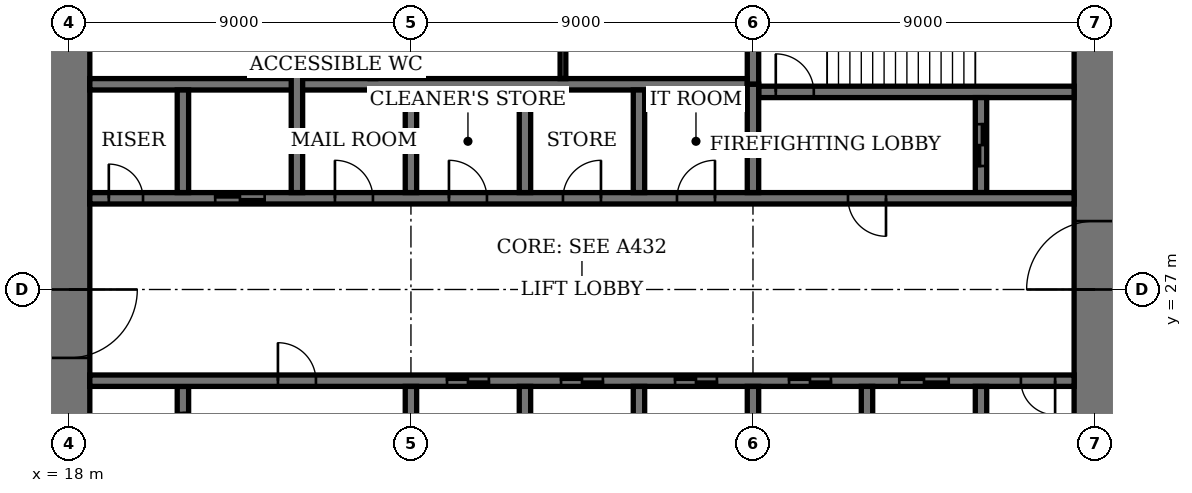
"""IFC4 building model, lengths in metres.
Left out: names, types, materials, properties, quantities, classifications, styles, units other than length and angle.
Written with IfcOpenShell. Run it as: python <this file> out.ifc"""

import sys

from ifc_helpers import new_model, si_unit, direction, frame, frame_2d, origin, place, context, subcontext, project, spatial, rectangle, extrude, element, fill, save


model = new_model("IFC4")
c1 = context("Model", 3, precision=1e-05, world=origin(), true_north=direction((0.0, 1.0)))
c2 = subcontext(c1, "Body", "Model", "MODEL_VIEW")
j1 = project(units=[si_unit("LENGTHUNIT", "METRE"), si_unit("PLANEANGLEUNIT", "RADIAN")], contexts=[c1])
p1 = place(None, origin())
s1 = spatial("IfcSite", under=j1, at=p1, CompositionType="ELEMENT")
p2 = place(p1, origin())
s2 = spatial("IfcBuilding", under=s1, at=p2, CompositionType="ELEMENT")
p3 = place(p2, frame((0.0, 0.0, 247.4)))
s3 = spatial("IfcBuildingStorey", under=s2, at=p3, CompositionType="ELEMENT", Elevation=247.4)
p4 = place(p3, frame((18.0, 35.45, 0.0), z_axis=(0.0, 0.0, 1.0), x_axis=(0.0, -1.0, 0.0)))
e1 = element("IfcWall", 1, at=p4, inside=s3, PredefinedType="SHEAR", context=c2, shape_type="SweptSolid", body=[
    extrude(rectangle(XDim=16.9, YDim=1.1, at=frame_2d((8.45, 0.0))), origin(), (0.0, 0.0, 1.0), 4.0),
])
p5 = place(p4, frame((8.45, 0.0, 0.0)))
e2 = element("IfcOpeningElement", 2, at=p5, cuts=e1, PredefinedType="OPENING", context=c2, shape_type="SweptSolid", body=[
    extrude(rectangle(XDim=1.8, YDim=2.4, at=frame_2d((0.9, 1.2))), frame((0.0, 0.56, 0.0), z_axis=(0.0, -1.0, 0.0), x_axis=(1.0, 0.0, 0.0)), (0.0, 0.0, 1.0), 1.12),
])
p6 = place(p3, frame((45.0, 18.55, 0.0), z_axis=(0.0, 0.0, 1.0), x_axis=(0.0, 1.0, 0.0)))
e3 = element("IfcWall", 3, at=p6, inside=s3, PredefinedType="SHEAR", context=c2, shape_type="SweptSolid", body=[
    extrude(rectangle(XDim=16.9, YDim=1.1, at=frame_2d((8.45, 0.0))), origin(), (0.0, 0.0, 1.0), 4.0),
])
p7 = place(p6, frame((8.45, 0.0, 0.0)))
e4 = element("IfcOpeningElement", 4, at=p7, cuts=e3, PredefinedType="OPENING", context=c2, shape_type="SweptSolid", body=[
    extrude(rectangle(XDim=1.8, YDim=2.4, at=frame_2d((0.9, 1.2))), frame((0.0, 0.56, 0.0), z_axis=(0.0, -1.0, 0.0), x_axis=(1.0, 0.0, 0.0)), (0.0, 0.0, 1.0), 1.12),
])
p8 = place(p3, frame((36.15, 32.2, 0.0), z_axis=(0.0, 0.0, 1.0), x_axis=(1.0, 0.0, 0.0)))
e5 = element("IfcWall", 5, at=p8, inside=s3, PredefinedType="SHEAR", context=c2, shape_type="SweptSolid", body=[
    extrude(rectangle(XDim=8.3, YDim=0.3, at=frame_2d((4.15, 0.0))), origin(), (0.0, 0.0, 1.0), 4.0),
])
p9 = place(p8, frame((0.45, 0.0, 0.0)))
e6 = element("IfcOpeningElement", 6, at=p9, cuts=e5, PredefinedType="OPENING", context=c2, shape_type="SweptSolid", body=[
    extrude(rectangle(XDim=1.0, YDim=2.4, at=frame_2d((0.5, 1.2))), frame((0.0, 0.16, 0.0), z_axis=(0.0, -1.0, 0.0), x_axis=(1.0, 0.0, 0.0)), (0.0, 0.0, 1.0), 0.32),
])
p10 = place(p3, frame((36.0, 32.4, 0.0), z_axis=(0.0, 0.0, 1.0), x_axis=(0.0, 1.0, 0.0)))
e7 = element("IfcWall", 7, at=p10, inside=s3, PredefinedType="SHEAR", context=c2, shape_type="SweptSolid", body=[
    extrude(rectangle(XDim=3.05, YDim=0.3, at=frame_2d((1.525, 0.0))), origin(), (0.0, 0.0, 1.0), 4.0),
])
p11 = place(p3, frame((21.0, 21.95, 0.0), z_axis=(0.0, 0.0, 1.0), x_axis=(0.0, 1.0, 0.0)))
e8 = element("IfcWall", 8, at=p11, inside=s3, PredefinedType="SHEAR", context=c2, shape_type="SweptSolid", body=[
    extrude(rectangle(XDim=2.5, YDim=0.3, at=frame_2d((1.25, 0.0))), origin(), (0.0, 0.0, 1.0), 4.0),
])
p12 = place(p11, frame((0.7, 0.0, 0.0)))
e9 = element("IfcOpeningElement", 9, at=p12, cuts=e8, PredefinedType="OPENING", context=c2, shape_type="SweptSolid", body=[
    extrude(rectangle(XDim=1.1, YDim=2.4, at=frame_2d((0.55, 1.2))), frame((0.0, 0.16, 0.0), z_axis=(0.0, -1.0, 0.0), x_axis=(1.0, 0.0, 0.0)), (0.0, 0.0, 1.0), 0.32),
])
p13 = place(p3, frame((42.0, 29.55, 0.0), z_axis=(0.0, 0.0, 1.0), x_axis=(0.0, 1.0, 0.0)))
e10 = element("IfcWall", 10, at=p13, inside=s3, PredefinedType="SHEAR", context=c2, shape_type="SweptSolid", body=[
    extrude(rectangle(XDim=2.5, YDim=0.3, at=frame_2d((1.25, 0.0))), origin(), (0.0, 0.0, 1.0), 4.0),
])
p14 = place(p13, frame((0.7, 0.0, 0.0)))
e11 = element("IfcOpeningElement", 11, at=p14, cuts=e10, PredefinedType="OPENING", context=c2, shape_type="SweptSolid", body=[
    extrude(rectangle(XDim=1.1, YDim=2.4, at=frame_2d((0.55, 1.2))), frame((0.0, 0.16, 0.0), z_axis=(0.0, -1.0, 0.0), x_axis=(1.0, 0.0, 0.0)), (0.0, 0.0, 1.0), 0.32),
])
p15 = place(p3, frame((18.55, 24.6, 0.0), z_axis=(0.0, 0.0, 1.0), x_axis=(1.0, 0.0, 0.0)))
e12 = element("IfcWall", 12, at=p15, inside=s3, PredefinedType="SHEAR", context=c2, shape_type="SweptSolid", body=[
    extrude(rectangle(XDim=25.9, YDim=0.3, at=frame_2d((12.95, 0.0))), origin(), (0.0, 0.0, 1.0), 4.0),
])
p16 = place(p15, frame((4.95, 0.0, 0.0)))
e13 = element("IfcOpeningElement", 13, at=p16, cuts=e12, PredefinedType="OPENING", context=c2, shape_type="SweptSolid", body=[
    extrude(rectangle(XDim=1.0, YDim=2.4, at=frame_2d((0.5, 1.2))), frame((0.0, 0.16, 0.0), z_axis=(0.0, -1.0, 0.0), x_axis=(1.0, 0.0, 0.0)), (0.0, 0.0, 1.0), 0.32),
])
p17 = place(p15, frame((24.5, 0.0, 0.0)))
e14 = element("IfcOpeningElement", 14, at=p17, cuts=e12, PredefinedType="OPENING", context=c2, shape_type="SweptSolid", body=[
    extrude(rectangle(XDim=0.9, YDim=2.1, at=frame_2d((0.45, 1.05))), frame((0.0, 0.16, 0.0), z_axis=(0.0, -1.0, 0.0), x_axis=(1.0, 0.0, 0.0)), (0.0, 0.0, 1.0), 0.32),
])
p18 = place(p15, frame((9.4, 0.0, 0.0)))
e15 = element("IfcOpeningElement", 15, at=p18, cuts=e12, PredefinedType="OPENING", context=c2, shape_type="SweptSolid", body=[
    extrude(rectangle(XDim=1.1, YDim=2.4, at=frame_2d((0.55, 1.2))), frame((0.0, 0.16, 0.0), z_axis=(0.0, -1.0, 0.0), x_axis=(1.0, 0.0, 0.0)), (0.0, 0.0, 1.0), 0.32),
])
p19 = place(p15, frame((12.4, 0.0, 0.0)))
e16 = element("IfcOpeningElement", 16, at=p19, cuts=e12, PredefinedType="OPENING", context=c2, shape_type="SweptSolid", body=[
    extrude(rectangle(XDim=1.1, YDim=2.4, at=frame_2d((0.55, 1.2))), frame((0.0, 0.16, 0.0), z_axis=(0.0, -1.0, 0.0), x_axis=(1.0, 0.0, 0.0)), (0.0, 0.0, 1.0), 0.32),
])
p20 = place(p15, frame((15.4, 0.0, 0.0)))
e17 = element("IfcOpeningElement", 17, at=p20, cuts=e12, PredefinedType="OPENING", context=c2, shape_type="SweptSolid", body=[
    extrude(rectangle(XDim=1.1, YDim=2.4, at=frame_2d((0.55, 1.2))), frame((0.0, 0.16, 0.0), z_axis=(0.0, -1.0, 0.0), x_axis=(1.0, 0.0, 0.0)), (0.0, 0.0, 1.0), 0.32),
])
p21 = place(p15, frame((18.4, 0.0, 0.0)))
e18 = element("IfcOpeningElement", 18, at=p21, cuts=e12, PredefinedType="OPENING", context=c2, shape_type="SweptSolid", body=[
    extrude(rectangle(XDim=1.1, YDim=2.4, at=frame_2d((0.55, 1.2))), frame((0.0, 0.16, 0.0), z_axis=(0.0, -1.0, 0.0), x_axis=(1.0, 0.0, 0.0)), (0.0, 0.0, 1.0), 0.32),
])
p22 = place(p15, frame((21.3, 0.0, 0.0)))
e19 = element("IfcOpeningElement", 19, at=p22, cuts=e12, PredefinedType="OPENING", context=c2, shape_type="SweptSolid", body=[
    extrude(rectangle(XDim=1.3, YDim=2.4, at=frame_2d((0.65, 1.2))), frame((0.0, 0.16, 0.0), z_axis=(0.0, -1.0, 0.0), x_axis=(1.0, 0.0, 0.0)), (0.0, 0.0, 1.0), 0.32),
])
p23 = place(p3, frame((18.55, 29.4, 0.0), z_axis=(0.0, 0.0, 1.0), x_axis=(1.0, 0.0, 0.0)))
e20 = element("IfcWall", 20, at=p23, inside=s3, PredefinedType="SHEAR", context=c2, shape_type="SweptSolid", body=[
    extrude(rectangle(XDim=25.9, YDim=0.3, at=frame_2d((12.95, 0.0))), origin(), (0.0, 0.0, 1.0), 4.0),
])
p24 = place(p23, frame((19.95, 0.0, 0.0)))
e21 = element("IfcOpeningElement", 21, at=p24, cuts=e20, PredefinedType="OPENING", context=c2, shape_type="SweptSolid", body=[
    extrude(rectangle(XDim=1.0, YDim=2.4, at=frame_2d((0.5, 1.2))), frame((0.0, 0.16, 0.0), z_axis=(0.0, -1.0, 0.0), x_axis=(1.0, 0.0, 0.0)), (0.0, 0.0, 1.0), 0.32),
])
p25 = place(p23, frame((0.5, 0.0, 0.0)))
e22 = element("IfcOpeningElement", 22, at=p25, cuts=e20, PredefinedType="OPENING", context=c2, shape_type="SweptSolid", body=[
    extrude(rectangle(XDim=0.9, YDim=2.1, at=frame_2d((0.45, 1.05))), frame((0.0, 0.16, 0.0), z_axis=(0.0, -1.0, 0.0), x_axis=(1.0, 0.0, 0.0)), (0.0, 0.0, 1.0), 0.32),
])
p26 = place(p23, frame((15.45, 0.0, 0.0)))
e23 = element("IfcOpeningElement", 23, at=p26, cuts=e20, PredefinedType="OPENING", context=c2, shape_type="SweptSolid", body=[
    extrude(rectangle(XDim=1.0, YDim=2.4, at=frame_2d((0.5, 1.2))), frame((0.0, 0.16, 0.0), z_axis=(0.0, -1.0, 0.0), x_axis=(1.0, 0.0, 0.0)), (0.0, 0.0, 1.0), 0.32),
])
p27 = place(p23, frame((12.45, 0.0, 0.0)))
e24 = element("IfcOpeningElement", 24, at=p27, cuts=e20, PredefinedType="OPENING", context=c2, shape_type="SweptSolid", body=[
    extrude(rectangle(XDim=1.0, YDim=2.4, at=frame_2d((0.5, 1.2))), frame((0.0, 0.16, 0.0), z_axis=(0.0, -1.0, 0.0), x_axis=(1.0, 0.0, 0.0)), (0.0, 0.0, 1.0), 0.32),
])
p28 = place(p23, frame((9.45, 0.0, 0.0)))
e25 = element("IfcOpeningElement", 25, at=p28, cuts=e20, PredefinedType="OPENING", context=c2, shape_type="SweptSolid", body=[
    extrude(rectangle(XDim=1.0, YDim=2.4, at=frame_2d((0.5, 1.2))), frame((0.0, 0.16, 0.0), z_axis=(0.0, -1.0, 0.0), x_axis=(1.0, 0.0, 0.0)), (0.0, 0.0, 1.0), 0.32),
])
p29 = place(p23, frame((6.45, 0.0, 0.0)))
e26 = element("IfcOpeningElement", 26, at=p29, cuts=e20, PredefinedType="OPENING", context=c2, shape_type="SweptSolid", body=[
    extrude(rectangle(XDim=1.0, YDim=2.4, at=frame_2d((0.5, 1.2))), frame((0.0, 0.16, 0.0), z_axis=(0.0, -1.0, 0.0), x_axis=(1.0, 0.0, 0.0)), (0.0, 0.0, 1.0), 0.32),
])
p30 = place(p23, frame((3.3, 0.0, 0.0)))
e27 = element("IfcOpeningElement", 27, at=p30, cuts=e20, PredefinedType="OPENING", context=c2, shape_type="SweptSolid", body=[
    extrude(rectangle(XDim=1.3, YDim=2.4, at=frame_2d((0.65, 1.2))), frame((0.0, 0.16, 0.0), z_axis=(0.0, -1.0, 0.0), x_axis=(1.0, 0.0, 0.0)), (0.0, 0.0, 1.0), 0.32),
])
p31 = place(p3, frame((18.55, 32.4, 0.0), z_axis=(0.0, 0.0, 1.0), x_axis=(1.0, 0.0, 0.0)))
e28 = element("IfcWall", 28, at=p31, inside=s3, PredefinedType="SHEAR", context=c2, shape_type="SweptSolid", body=[
    extrude(rectangle(XDim=17.3, YDim=0.3, at=frame_2d((8.65, 0.0))), origin(), (0.0, 0.0, 1.0), 4.0),
])
for number, where, z_axis, x_axis in (
    (29, (30.0, 21.75, 0.0), (0.0, 0.0, 1.0), (0.0, 1.0, 0.0)),
    (30, (33.0, 29.55, 0.0), (0.0, 0.0, 1.0), (0.0, 1.0, 0.0)),
    (31, (33.0, 21.75, 0.0), (0.0, 0.0, 1.0), (0.0, 1.0, 0.0)),
    (32, (30.0, 29.55, 0.0), (0.0, 0.0, 1.0), (0.0, 1.0, 0.0)),
    (33, (36.0, 21.75, 0.0), (0.0, 0.0, 1.0), (0.0, 1.0, 0.0)),
    (34, (27.0, 29.55, 0.0), (0.0, 0.0, 1.0), (0.0, 1.0, 0.0)),
):
    element("IfcWall", number, at=place(p3, frame(where, z_axis=z_axis, x_axis=x_axis)), inside=s3, PredefinedType="SHEAR", context=c2, shape_type="SweptSolid", body=[
        extrude(rectangle(XDim=2.7, YDim=0.3, at=frame_2d((1.35, 0.0))), origin(), (0.0, 0.0, 1.0), 4.0),
    ])
for number, where, z_axis, x_axis in (
    (35, (39.0, 18.55, 0.0), (0.0, 0.0, 1.0), (0.0, 1.0, 0.0)),
    (36, (24.0, 29.55, 0.0), (0.0, 0.0, 1.0), (0.0, 1.0, 0.0)),
):
    element("IfcWall", number, at=place(p3, frame(where, z_axis=z_axis, x_axis=x_axis)), inside=s3, PredefinedType="SHEAR", context=c2, shape_type="SweptSolid", body=[
        extrude(rectangle(XDim=5.9, YDim=0.3, at=frame_2d((2.95, 0.0))), origin(), (0.0, 0.0, 1.0), 4.0),
    ])
for number, where, z_axis, x_axis in (
    (37, (42.0, 21.75, 0.0), (0.0, 0.0, 1.0), (0.0, 1.0, 0.0)),
    (38, (21.0, 29.55, 0.0), (0.0, 0.0, 1.0), (0.0, 1.0, 0.0)),
):
    element("IfcWall", number, at=place(p3, frame(where, z_axis=z_axis, x_axis=x_axis)), inside=s3, PredefinedType="SHEAR", context=c2, shape_type="SweptSolid", body=[
        extrude(rectangle(XDim=2.7, YDim=0.3, at=frame_2d((1.35, 0.0))), origin(), (0.0, 0.0, 1.0), 4.0),
    ])
for number, where, z_axis, x_axis in (
    (39, (27.0, 21.6, 0.0), (0.0, 0.0, 1.0), (0.0, 1.0, 0.0)),
    (40, (36.0, 29.55, 0.0), (0.0, 0.0, 1.0), (0.0, 1.0, 0.0)),
):
    element("IfcWall", number, at=place(p3, frame(where, z_axis=z_axis, x_axis=x_axis)), inside=s3, PredefinedType="SHEAR", context=c2, shape_type="SweptSolid", body=[
        extrude(rectangle(XDim=2.85, YDim=0.3, at=frame_2d((1.425, 0.0))), origin(), (0.0, 0.0, 1.0), 4.0),
    ])
for number, where, z_axis, x_axis in (
    (41, (31.0, 32.55, 0.0), (0.0, 0.0, 1.0), (0.0, 1.0, 0.0)),
    (42, (26.0, 32.55, 0.0), (0.0, 0.0, 1.0), (0.0, 1.0, 0.0)),
):
    element("IfcWall", number, at=place(p3, frame(where, z_axis=z_axis, x_axis=x_axis)), inside=s3, PredefinedType="PARTITIONING", context=c2, shape_type="SweptSolid", body=[
        extrude(rectangle(XDim=2.9, YDim=0.15, at=frame_2d((1.45, 0.0))), origin(), (0.0, 0.0, 1.0), 3.75),
    ])
p32 = place(p5, origin())
e43 = element("IfcDoor", 43, at=p32, inside=s3, OperationType="DOUBLE_DOOR_DOUBLE_SWING", PredefinedType="DOOR", context=c2, shape_type="SweptSolid", body=[
    extrude(rectangle(XDim=1.8, YDim=2.4, at=frame_2d((0.9, 1.2))), frame((0.0, 0.03, 0.0), z_axis=(0.0, -1.0, 0.0), x_axis=(1.0, 0.0, 0.0)), (0.0, 0.0, 1.0), 0.06),
    extrude(rectangle(XDim=0.04, YDim=2.4, at=frame_2d((0.02, 1.2))), frame((0.0, 0.55, 0.0), z_axis=(0.0, -1.0, 0.0), x_axis=(1.0, 0.0, 0.0)), (0.0, 0.0, 1.0), 1.1),
    extrude(rectangle(XDim=0.04, YDim=2.4, at=frame_2d((1.78, 1.2))), frame((0.0, 0.55, 0.0), z_axis=(0.0, -1.0, 0.0), x_axis=(1.0, 0.0, 0.0)), (0.0, 0.0, 1.0), 1.1),
    extrude(rectangle(XDim=1.8, YDim=0.04, at=frame_2d((0.9, 2.38))), frame((0.0, 0.55, 0.0), z_axis=(0.0, -1.0, 0.0), x_axis=(1.0, 0.0, 0.0)), (0.0, 0.0, 1.0), 1.1),
])
fill(e2, e43)
p33 = place(p7, origin())
e44 = element("IfcDoor", 44, at=p33, inside=s3, OperationType="DOUBLE_DOOR_DOUBLE_SWING", PredefinedType="DOOR", context=c2, shape_type="SweptSolid", body=[
    extrude(rectangle(XDim=1.8, YDim=2.4, at=frame_2d((0.9, 1.2))), frame((0.0, 0.03, 0.0), z_axis=(0.0, -1.0, 0.0), x_axis=(1.0, 0.0, 0.0)), (0.0, 0.0, 1.0), 0.06),
    extrude(rectangle(XDim=0.04, YDim=2.4, at=frame_2d((0.02, 1.2))), frame((0.0, 0.55, 0.0), z_axis=(0.0, -1.0, 0.0), x_axis=(1.0, 0.0, 0.0)), (0.0, 0.0, 1.0), 1.1),
    extrude(rectangle(XDim=0.04, YDim=2.4, at=frame_2d((1.78, 1.2))), frame((0.0, 0.55, 0.0), z_axis=(0.0, -1.0, 0.0), x_axis=(1.0, 0.0, 0.0)), (0.0, 0.0, 1.0), 1.1),
    extrude(rectangle(XDim=1.8, YDim=0.04, at=frame_2d((0.9, 2.38))), frame((0.0, 0.55, 0.0), z_axis=(0.0, -1.0, 0.0), x_axis=(1.0, 0.0, 0.0)), (0.0, 0.0, 1.0), 1.1),
])
fill(e4, e44)
p34 = place(p9, origin())
e45 = element("IfcDoor", 45, at=p34, inside=s3, OperationType="SINGLE_SWING_RIGHT", PredefinedType="DOOR", context=c2, shape_type="SweptSolid", body=[
    extrude(rectangle(XDim=1.0, YDim=2.4, at=frame_2d((0.5, 1.2))), frame((0.0, 0.03, 0.0), z_axis=(0.0, -1.0, 0.0), x_axis=(1.0, 0.0, 0.0)), (0.0, 0.0, 1.0), 0.06),
])
fill(e6, e45)
p35 = place(p16, origin())
e46 = element("IfcDoor", 46, at=p35, inside=s3, OperationType="SINGLE_SWING_RIGHT", PredefinedType="DOOR", context=c2, shape_type="SweptSolid", body=[
    extrude(rectangle(XDim=1.0, YDim=2.4, at=frame_2d((0.5, 1.2))), frame((0.0, 0.03, 0.0), z_axis=(0.0, -1.0, 0.0), x_axis=(1.0, 0.0, 0.0)), (0.0, 0.0, 1.0), 0.06),
])
fill(e13, e46)
p36 = place(p24, origin())
e47 = element("IfcDoor", 47, at=p36, inside=s3, OperationType="SINGLE_SWING_RIGHT", PredefinedType="DOOR", context=c2, shape_type="SweptSolid", body=[
    extrude(rectangle(XDim=1.0, YDim=2.4, at=frame_2d((0.5, 1.2))), frame((0.0, 0.03, 0.0), z_axis=(0.0, -1.0, 0.0), x_axis=(1.0, 0.0, 0.0)), (0.0, 0.0, 1.0), 0.06),
])
fill(e21, e47)
p37 = place(p17, origin())
e48 = element("IfcDoor", 48, at=p37, inside=s3, OperationType="SINGLE_SWING_RIGHT", PredefinedType="DOOR", context=c2, shape_type="SweptSolid", body=[
    extrude(rectangle(XDim=0.9, YDim=2.1, at=frame_2d((0.45, 1.05))), frame((0.0, 0.03, 0.0), z_axis=(0.0, -1.0, 0.0), x_axis=(1.0, 0.0, 0.0)), (0.0, 0.0, 1.0), 0.06),
])
fill(e14, e48)
p38 = place(p25, origin())
e49 = element("IfcDoor", 49, at=p38, inside=s3, OperationType="SINGLE_SWING_RIGHT", PredefinedType="DOOR", context=c2, shape_type="SweptSolid", body=[
    extrude(rectangle(XDim=0.9, YDim=2.1, at=frame_2d((0.45, 1.05))), frame((0.0, 0.03, 0.0), z_axis=(0.0, -1.0, 0.0), x_axis=(1.0, 0.0, 0.0)), (0.0, 0.0, 1.0), 0.06),
])
fill(e22, e49)
p39 = place(p18, origin())
e50 = element("IfcDoor", 50, at=p39, inside=s3, OperationType="DOUBLE_DOOR_SLIDING", PredefinedType="DOOR", context=c2, shape_type="SweptSolid", body=[
    extrude(rectangle(XDim=1.1, YDim=2.4, at=frame_2d((0.55, 1.2))), frame((0.0, 0.02, 0.0), z_axis=(0.0, -1.0, 0.0), x_axis=(1.0, 0.0, 0.0)), (0.0, 0.0, 1.0), 0.04),
])
fill(e15, e50)
p40 = place(p19, origin())
e51 = element("IfcDoor", 51, at=p40, inside=s3, OperationType="DOUBLE_DOOR_SLIDING", PredefinedType="DOOR", context=c2, shape_type="SweptSolid", body=[
    extrude(rectangle(XDim=1.1, YDim=2.4, at=frame_2d((0.55, 1.2))), frame((0.0, 0.02, 0.0), z_axis=(0.0, -1.0, 0.0), x_axis=(1.0, 0.0, 0.0)), (0.0, 0.0, 1.0), 0.04),
])
fill(e16, e51)
p41 = place(p20, origin())
e52 = element("IfcDoor", 52, at=p41, inside=s3, OperationType="DOUBLE_DOOR_SLIDING", PredefinedType="DOOR", context=c2, shape_type="SweptSolid", body=[
    extrude(rectangle(XDim=1.1, YDim=2.4, at=frame_2d((0.55, 1.2))), frame((0.0, 0.02, 0.0), z_axis=(0.0, -1.0, 0.0), x_axis=(1.0, 0.0, 0.0)), (0.0, 0.0, 1.0), 0.04),
])
fill(e17, e52)
p42 = place(p21, origin())
e53 = element("IfcDoor", 53, at=p42, inside=s3, OperationType="DOUBLE_DOOR_SLIDING", PredefinedType="DOOR", context=c2, shape_type="SweptSolid", body=[
    extrude(rectangle(XDim=1.1, YDim=2.4, at=frame_2d((0.55, 1.2))), frame((0.0, 0.02, 0.0), z_axis=(0.0, -1.0, 0.0), x_axis=(1.0, 0.0, 0.0)), (0.0, 0.0, 1.0), 0.04),
])
fill(e18, e53)
p43 = place(p26, origin())
e54 = element("IfcDoor", 54, at=p43, inside=s3, OperationType="SINGLE_SWING_LEFT", PredefinedType="DOOR", context=c2, shape_type="SweptSolid", body=[
    extrude(rectangle(XDim=1.0, YDim=2.4, at=frame_2d((0.5, 1.2))), frame((0.0, 0.03, 0.0), z_axis=(0.0, -1.0, 0.0), x_axis=(1.0, 0.0, 0.0)), (0.0, 0.0, 1.0), 0.06),
])
fill(e23, e54)
p44 = place(p27, origin())
e55 = element("IfcDoor", 55, at=p44, inside=s3, OperationType="SINGLE_SWING_LEFT", PredefinedType="DOOR", context=c2, shape_type="SweptSolid", body=[
    extrude(rectangle(XDim=1.0, YDim=2.4, at=frame_2d((0.5, 1.2))), frame((0.0, 0.03, 0.0), z_axis=(0.0, -1.0, 0.0), x_axis=(1.0, 0.0, 0.0)), (0.0, 0.0, 1.0), 0.06),
])
fill(e24, e55)
p45 = place(p28, origin())
e56 = element("IfcDoor", 56, at=p45, inside=s3, OperationType="SINGLE_SWING_RIGHT", PredefinedType="DOOR", context=c2, shape_type="SweptSolid", body=[
    extrude(rectangle(XDim=1.0, YDim=2.4, at=frame_2d((0.5, 1.2))), frame((0.0, 0.03, 0.0), z_axis=(0.0, -1.0, 0.0), x_axis=(1.0, 0.0, 0.0)), (0.0, 0.0, 1.0), 0.06),
])
fill(e25, e56)
p46 = place(p29, origin())
e57 = element("IfcDoor", 57, at=p46, inside=s3, OperationType="SINGLE_SWING_RIGHT", PredefinedType="DOOR", context=c2, shape_type="SweptSolid", body=[
    extrude(rectangle(XDim=1.0, YDim=2.4, at=frame_2d((0.5, 1.2))), frame((0.0, 0.03, 0.0), z_axis=(0.0, -1.0, 0.0), x_axis=(1.0, 0.0, 0.0)), (0.0, 0.0, 1.0), 0.06),
])
fill(e26, e57)
p47 = place(p22, origin())
e58 = element("IfcDoor", 58, at=p47, inside=s3, OperationType="DOUBLE_DOOR_SLIDING", PredefinedType="DOOR", context=c2, shape_type="SweptSolid", body=[
    extrude(rectangle(XDim=1.3, YDim=2.4, at=frame_2d((0.65, 1.2))), frame((0.0, 0.02, 0.0), z_axis=(0.0, -1.0, 0.0), x_axis=(1.0, 0.0, 0.0)), (0.0, 0.0, 1.0), 0.04),
])
fill(e19, e58)
p48 = place(p30, origin())
e59 = element("IfcDoor", 59, at=p48, inside=s3, OperationType="DOUBLE_DOOR_SLIDING", PredefinedType="DOOR", context=c2, shape_type="SweptSolid", body=[
    extrude(rectangle(XDim=1.3, YDim=2.4, at=frame_2d((0.65, 1.2))), frame((0.0, 0.02, 0.0), z_axis=(0.0, -1.0, 0.0), x_axis=(1.0, 0.0, 0.0)), (0.0, 0.0, 1.0), 0.04),
])
fill(e27, e59)
p49 = place(p14, origin())
e60 = element("IfcDoor", 60, at=p49, inside=s3, OperationType="DOUBLE_DOOR_SLIDING", PredefinedType="DOOR", context=c2, shape_type="SweptSolid", body=[
    extrude(rectangle(XDim=1.1, YDim=2.4, at=frame_2d((0.55, 1.2))), frame((0.0, 0.03, 0.0), z_axis=(0.0, -1.0, 0.0), x_axis=(1.0, 0.0, 0.0)), (0.0, 0.0, 1.0), 0.06),
])
fill(e11, e60)
save(model, sys.argv[1])
